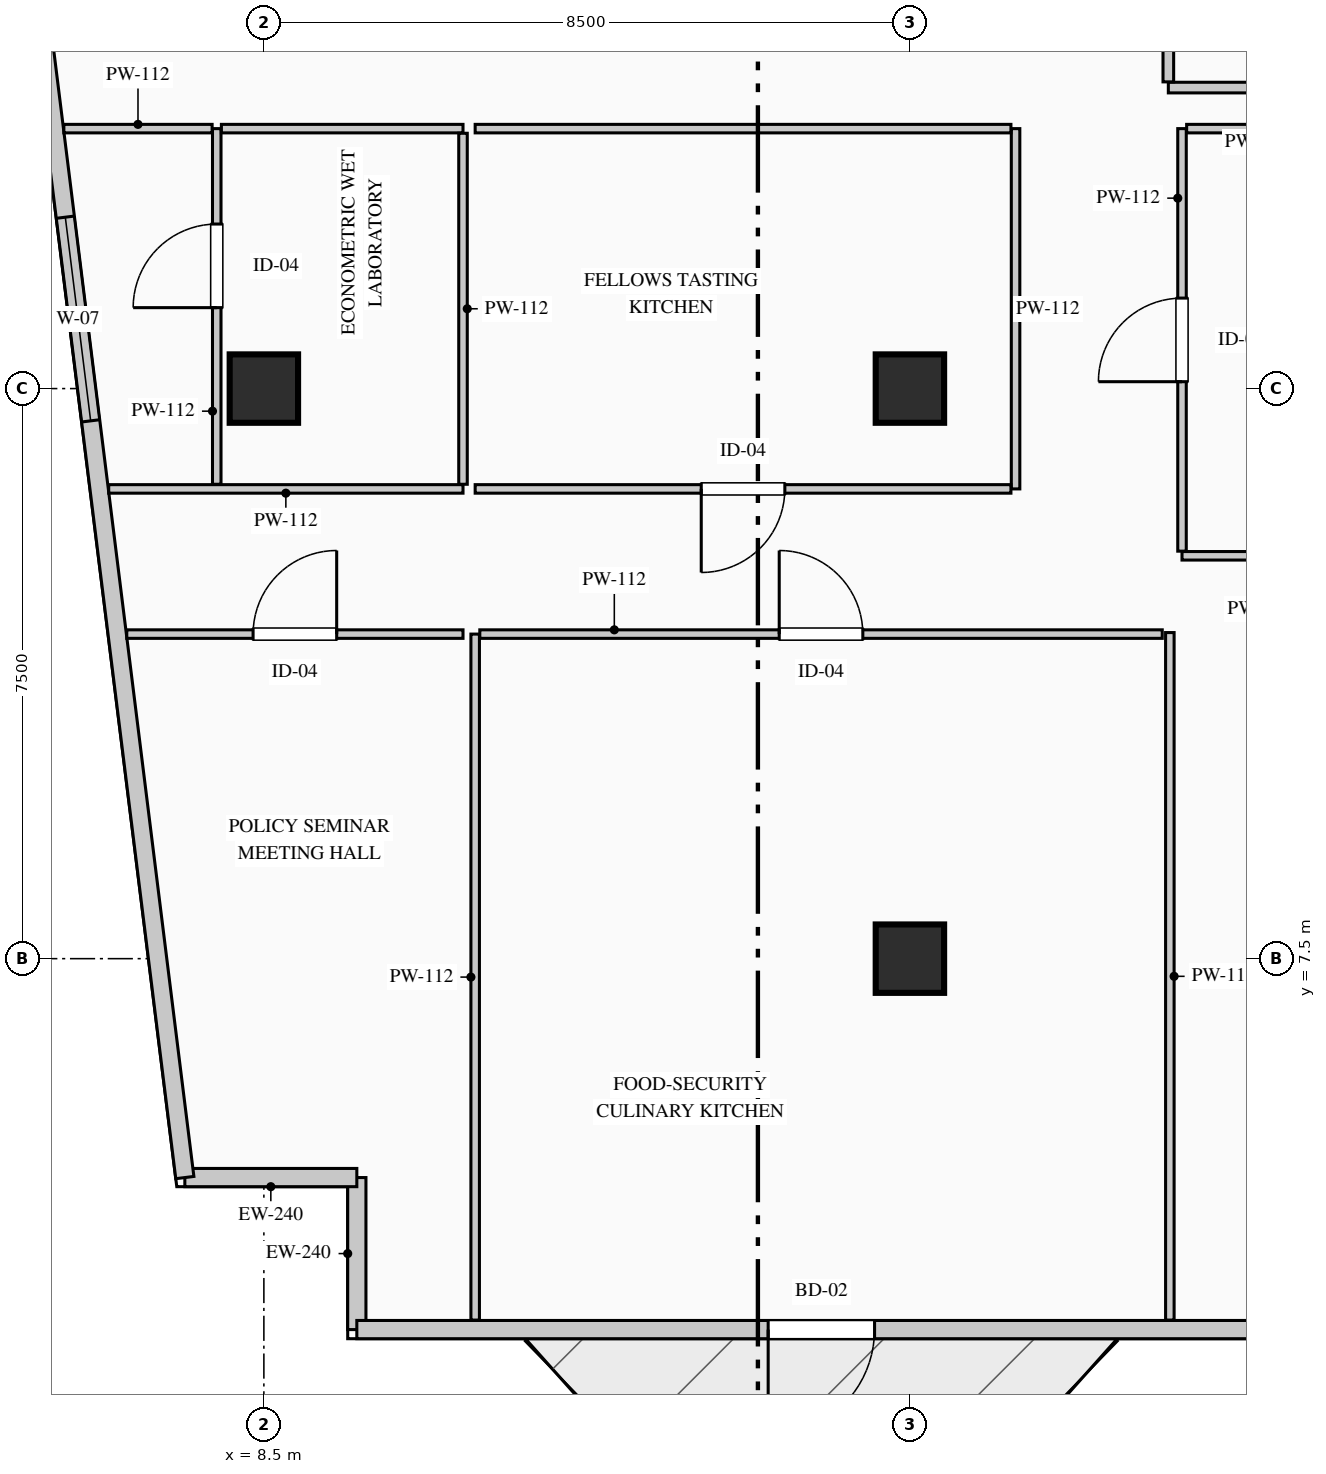
"""IFC4 building model, lengths in metres.
Left out: names, types, materials, properties, quantities, classifications, styles, units other than length and angle.
Written with IfcOpenShell. Run it as: python <this file> out.ifc"""

import sys

from ifc_helpers import new_model, si_unit, direction, frame, frame_2d, origin, origin_2d, place, context, subcontext, project, spatial, rectangle, extrude, element, fill, save


model = new_model("IFC4")
c1 = context("Model", 3, precision=1e-05, world=origin(), true_north=direction((0.0, 1.0)))
c2 = subcontext(c1, "Body", "Model", "MODEL_VIEW")
j1 = project(units=[si_unit("LENGTHUNIT", "METRE"), si_unit("PLANEANGLEUNIT", "RADIAN")], contexts=[c1])
p1 = place(None, origin())
s1 = spatial("IfcSite", under=j1, at=p1, CompositionType="ELEMENT")
p2 = place(p1, origin())
s2 = spatial("IfcBuilding", under=s1, at=p2, CompositionType="ELEMENT")
p3 = place(p2, frame((0.0, 0.0, 215.35)))
s3 = spatial("IfcBuildingStorey", under=s2, at=p3, CompositionType="ELEMENT", Elevation=215.35)
for number, where, z_axis, x_axis in (
    (1, (8.5, 15.0, 0.0), (0.0, 0.0, 1.0), (1.0, 0.0, 0.0)),
    (2, (17.0, 7.5, 0.0), (0.0, 0.0, 1.0), (1.0, 0.0, 0.0)),
    (3, (17.0, 15.0, 0.0), (0.0, 0.0, 1.0), (1.0, 0.0, 0.0)),
):
    element("IfcColumn", number, at=place(p3, frame(where, z_axis=z_axis, x_axis=x_axis)), inside=s3, PredefinedType="COLUMN", context=c2, shape_type="SweptSolid", body=[
        extrude(rectangle(XDim=0.9, YDim=0.9, at=origin_2d()), origin(), (0.0, 0.0, 1.0), 3.95),
    ])
p4 = place(p3, frame((9.723, 2.62, 0.0), z_axis=(0.0, 0.0, 1.0), x_axis=(0.0, 1.0, 0.0)))
e4 = element("IfcWall", 4, at=p4, inside=s3, PredefinedType="STANDARD", context=c2, shape_type="SweptSolid", body=[
    extrude(rectangle(XDim=2.0, YDim=0.24, at=frame_2d((1.0, 0.0))), origin(), (0.0, 0.0, 1.0), 3.7),
])
p5 = place(p3, frame((9.723, 4.62, 0.0), z_axis=(0.0, 0.0, 1.0), x_axis=(-1.0, 0.0, 0.0)))
e5 = element("IfcWall", 5, at=p5, inside=s3, PredefinedType="STANDARD", context=c2, shape_type="SweptSolid", body=[
    extrude(rectangle(XDim=2.263, YDim=0.24, at=frame_2d((1.131, 0.0))), origin(), (0.0, 0.0, 1.0), 3.7),
])
p6 = place(p3, frame((7.46, 4.62, 0.0), z_axis=(0.0, 0.0, 1.0), x_axis=(-0.123515576323, 0.992342633573, 0.0)))
e6 = element("IfcWall", 6, at=p6, inside=s3, PredefinedType="STANDARD", context=c2, shape_type="SweptSolid", body=[
    extrude(rectangle(XDim=37.043, YDim=0.24, at=frame_2d((18.522, 0.0))), origin(), (0.0, 0.0, 1.0), 3.7),
])
p7 = place(p6, frame((10.032, 0.0, 0.9)))
e7 = element("IfcOpeningElement", 7, at=p7, cuts=e6, PredefinedType="OPENING", context=c2, shape_type="SweptSolid", body=[
    extrude(rectangle(XDim=2.7, YDim=2.1, at=frame_2d((1.35, 1.05))), frame((0.0, 0.13, 0.0), z_axis=(0.0, -1.0, 0.0), x_axis=(1.0, 0.0, 0.0)), (0.0, 0.0, 1.0), 0.26),
])
p8 = place(p3, frame((21.946, 2.62, 0.0), z_axis=(0.0, 0.0, 1.0), x_axis=(-1.0, 0.0, 0.0)))
e8 = element("IfcWall", 8, at=p8, inside=s3, PredefinedType="STANDARD", context=c2, shape_type="SweptSolid", body=[
    extrude(rectangle(XDim=12.223, YDim=0.24, at=frame_2d((6.112, 0.0))), origin(), (0.0, 0.0, 1.0), 3.7),
])
p9 = place(p8, frame((5.411, 0.0, 0.0)))
e9 = element("IfcOpeningElement", 9, at=p9, cuts=e8, PredefinedType="OPENING", context=c2, shape_type="SweptSolid", body=[
    extrude(rectangle(XDim=1.4, YDim=2.2, at=frame_2d((0.7, 1.1))), frame((0.0, 0.13, 0.0), z_axis=(0.0, -1.0, 0.0), x_axis=(1.0, 0.0, 0.0)), (0.0, 0.0, 1.0), 0.26),
])
p10 = place(p3, frame((22.725, 18.96, 0.0), z_axis=(0.0, 0.0, 1.0), x_axis=(-1.0, 0.0, 0.0)))
e10 = element("IfcWall", 10, at=p10, inside=s3, PredefinedType="PARTITIONING", context=c2, shape_type="SweptSolid", body=[
    extrude(rectangle(XDim=2.325, YDim=0.14, at=frame_2d((1.163, 0.0))), origin(), (0.0, 0.0, 1.0), 3.7),
])
p11 = place(p3, frame((20.4, 19.035, 0.0), z_axis=(0.0, 0.0, 1.0), x_axis=(0.0, 1.0, 0.0)))
e11 = element("IfcWall", 11, at=p11, inside=s3, PredefinedType="PARTITIONING", context=c2, shape_type="SweptSolid", body=[
    extrude(rectangle(XDim=2.965, YDim=0.14, at=frame_2d((1.482, 0.0))), origin(), (0.0, 0.0, 1.0), 3.7),
])
p12 = place(p11, frame((1.008, 0.0, 0.0)))
e12 = element("IfcOpeningElement", 12, at=p12, cuts=e11, PredefinedType="OPENING", context=c2, shape_type="SweptSolid", body=[
    extrude(rectangle(XDim=0.95, YDim=2.15, at=frame_2d((0.475, 1.075))), frame((0.0, 0.08, 0.0), z_axis=(0.0, -1.0, 0.0), x_axis=(1.0, 0.0, 0.0)), (0.0, 0.0, 1.0), 0.16),
])
p13 = place(p3, frame((11.28, 2.745, 0.0), z_axis=(0.0, 0.0, 1.0), x_axis=(0.0, 1.0, 0.0)))
e13 = element("IfcWall", 13, at=p13, inside=s3, PredefinedType="PARTITIONING", context=c2, shape_type="SweptSolid", body=[
    extrude(rectangle(XDim=9.025, YDim=0.112, at=frame_2d((4.512, 0.0))), origin(), (0.0, 0.0, 1.0), 3.7),
])
p14 = place(p3, frame((11.341, 11.77, 0.0), z_axis=(0.0, 0.0, 1.0), x_axis=(1.0, 0.0, 0.0)))
e14 = element("IfcWall", 14, at=p14, inside=s3, PredefinedType="PARTITIONING", context=c2, shape_type="SweptSolid", body=[
    extrude(rectangle(XDim=8.979, YDim=0.112, at=frame_2d((4.49, 0.0))), origin(), (0.0, 0.0, 1.0), 3.7),
])
p15 = place(p14, frame((3.939, 0.0, 0.0)))
e15 = element("IfcOpeningElement", 15, at=p15, cuts=e14, PredefinedType="OPENING", context=c2, shape_type="SweptSolid", body=[
    extrude(rectangle(XDim=1.1, YDim=2.2, at=frame_2d((0.55, 1.1))), frame((0.0, 0.066, 0.0), z_axis=(0.0, -1.0, 0.0), x_axis=(1.0, 0.0, 0.0)), (0.0, 0.0, 1.0), 0.132),
])
p16 = place(p3, frame((20.42, 11.79, 0.0), z_axis=(0.0, 0.0, 1.0), x_axis=(0.0, -1.0, 0.0)))
e16 = element("IfcWall", 16, at=p16, inside=s3, PredefinedType="PARTITIONING", context=c2, shape_type="SweptSolid", body=[
    extrude(rectangle(XDim=9.045, YDim=0.112, at=frame_2d((4.522, 0.0))), origin(), (0.0, 0.0, 1.0), 3.7),
])
p17 = place(p3, frame((6.696, 11.77, 0.0), z_axis=(0.0, 0.0, 1.0), x_axis=(1.0, 0.0, 0.0)))
e17 = element("IfcWall", 17, at=p17, inside=s3, PredefinedType="PARTITIONING", context=c2, shape_type="SweptSolid", body=[
    extrude(rectangle(XDim=4.424, YDim=0.112, at=frame_2d((2.212, 0.0))), origin(), (0.0, 0.0, 1.0), 3.7),
])
p18 = place(p17, frame((1.662, 0.0, 0.0)))
e18 = element("IfcOpeningElement", 18, at=p18, cuts=e17, PredefinedType="OPENING", context=c2, shape_type="SweptSolid", body=[
    extrude(rectangle(XDim=1.1, YDim=2.2, at=frame_2d((0.55, 1.1))), frame((0.0, 0.066, 0.0), z_axis=(0.0, -1.0, 0.0), x_axis=(1.0, 0.0, 0.0)), (0.0, 0.0, 1.0), 0.132),
])
p19 = place(p3, frame((11.12, 13.68, 0.0), z_axis=(0.0, 0.0, 1.0), x_axis=(-1.0, 0.0, 0.0)))
e19 = element("IfcWall", 19, at=p19, inside=s3, PredefinedType="PARTITIONING", context=c2, shape_type="SweptSolid", body=[
    extrude(rectangle(XDim=4.662, YDim=0.112, at=frame_2d((2.331, 0.0))), origin(), (0.0, 0.0, 1.0), 3.7),
])
p20 = place(p3, frame((7.88, 13.741, 0.0), z_axis=(0.0, 0.0, 1.0), x_axis=(0.0, 1.0, 0.0)))
e20 = element("IfcWall", 20, at=p20, inside=s3, PredefinedType="PARTITIONING", context=c2, shape_type="SweptSolid", body=[
    extrude(rectangle(XDim=4.679, YDim=0.112, at=frame_2d((2.339, 0.0))), origin(), (0.0, 0.0, 1.0), 3.7),
])
p21 = place(p20, frame((2.324, 0.0, 0.0)))
e21 = element("IfcOpeningElement", 21, at=p21, cuts=e20, PredefinedType="OPENING", context=c2, shape_type="SweptSolid", body=[
    extrude(rectangle(XDim=1.1, YDim=2.2, at=frame_2d((0.55, 1.1))), frame((0.0, 0.066, 0.0), z_axis=(0.0, -1.0, 0.0), x_axis=(1.0, 0.0, 0.0)), (0.0, 0.0, 1.0), 0.132),
])
p22 = place(p3, frame((5.868, 18.42, 0.0), z_axis=(0.0, 0.0, 1.0), x_axis=(1.0, 0.0, 0.0)))
e22 = element("IfcWall", 22, at=p22, inside=s3, PredefinedType="PARTITIONING", context=c2, shape_type="SweptSolid", body=[
    extrude(rectangle(XDim=1.951, YDim=0.112, at=frame_2d((0.975, 0.0))), origin(), (0.0, 0.0, 1.0), 3.7),
])
p23 = place(p3, frame((7.941, 18.42, 0.0), z_axis=(0.0, 0.0, 1.0), x_axis=(1.0, 0.0, 0.0)))
e23 = element("IfcWall", 23, at=p23, inside=s3, PredefinedType="PARTITIONING", context=c2, shape_type="SweptSolid", body=[
    extrude(rectangle(XDim=3.179, YDim=0.112, at=frame_2d((1.59, 0.0))), origin(), (0.0, 0.0, 1.0), 3.7),
])
p24 = place(p3, frame((11.12, 18.359, 0.0), z_axis=(0.0, 0.0, 1.0), x_axis=(0.0, -1.0, 0.0)))
e24 = element("IfcWall", 24, at=p24, inside=s3, PredefinedType="PARTITIONING", context=c2, shape_type="SweptSolid", body=[
    extrude(rectangle(XDim=4.618, YDim=0.112, at=frame_2d((2.309, 0.0))), origin(), (0.0, 0.0, 1.0), 3.7),
])
p25 = place(p3, frame((18.39, 18.42, 0.0), z_axis=(0.0, 0.0, 1.0), x_axis=(0.0, -1.0, 0.0)))
e25 = element("IfcWall", 25, at=p25, inside=s3, PredefinedType="PARTITIONING", context=c2, shape_type="SweptSolid", body=[
    extrude(rectangle(XDim=4.74, YDim=0.112, at=frame_2d((2.37, 0.0))), origin(), (0.0, 0.0, 1.0), 3.7),
])
p26 = place(p3, frame((18.329, 13.68, 0.0), z_axis=(0.0, 0.0, 1.0), x_axis=(-1.0, 0.0, 0.0)))
e26 = element("IfcWall", 26, at=p26, inside=s3, PredefinedType="PARTITIONING", context=c2, shape_type="SweptSolid", body=[
    extrude(rectangle(XDim=7.049, YDim=0.112, at=frame_2d((3.524, 0.0))), origin(), (0.0, 0.0, 1.0), 3.7),
])
p27 = place(p26, frame((2.975, 0.0, 0.0)))
e27 = element("IfcOpeningElement", 27, at=p27, cuts=e26, PredefinedType="OPENING", context=c2, shape_type="SweptSolid", body=[
    extrude(rectangle(XDim=1.1, YDim=2.2, at=frame_2d((0.55, 1.1))), frame((0.0, 0.066, 0.0), z_axis=(0.0, -1.0, 0.0), x_axis=(1.0, 0.0, 0.0)), (0.0, 0.0, 1.0), 0.132),
])
p28 = place(p3, frame((11.28, 18.42, 0.0), z_axis=(0.0, 0.0, 1.0), x_axis=(1.0, 0.0, 0.0)))
e28 = element("IfcWall", 28, at=p28, inside=s3, PredefinedType="PARTITIONING", context=c2, shape_type="SweptSolid", body=[
    extrude(rectangle(XDim=7.049, YDim=0.112, at=frame_2d((3.524, 0.0))), origin(), (0.0, 0.0, 1.0), 3.7),
])
p29 = place(p3, frame((22.615, 12.8, 0.0), z_axis=(0.0, 0.0, 1.0), x_axis=(-1.0, 0.0, 0.0)))
e29 = element("IfcWall", 29, at=p29, inside=s3, PredefinedType="PARTITIONING", context=c2, shape_type="SweptSolid", body=[
    extrude(rectangle(XDim=2.035, YDim=0.112, at=frame_2d((1.018, 0.0))), origin(), (0.0, 0.0, 1.0), 3.7),
])
p30 = place(p3, frame((20.58, 12.861, 0.0), z_axis=(0.0, 0.0, 1.0), x_axis=(0.0, 1.0, 0.0)))
e30 = element("IfcWall", 30, at=p30, inside=s3, PredefinedType="PARTITIONING", context=c2, shape_type="SweptSolid", body=[
    extrude(rectangle(XDim=5.559, YDim=0.112, at=frame_2d((2.779, 0.0))), origin(), (0.0, 0.0, 1.0), 3.7),
])
p31 = place(p30, frame((2.229, 0.0, 0.0)))
e31 = element("IfcOpeningElement", 31, at=p31, cuts=e30, PredefinedType="OPENING", context=c2, shape_type="SweptSolid", body=[
    extrude(rectangle(XDim=1.1, YDim=2.2, at=frame_2d((0.55, 1.1))), frame((0.0, 0.066, 0.0), z_axis=(0.0, -1.0, 0.0), x_axis=(1.0, 0.0, 0.0)), (0.0, 0.0, 1.0), 0.132),
])
p32 = place(p3, frame((20.641, 18.42, 0.0), z_axis=(0.0, 0.0, 1.0), x_axis=(1.0, 0.0, 0.0)))
e32 = element("IfcWall", 32, at=p32, inside=s3, PredefinedType="PARTITIONING", context=c2, shape_type="SweptSolid", body=[
    extrude(rectangle(XDim=2.249, YDim=0.112, at=frame_2d((1.125, 0.0))), origin(), (0.0, 0.0, 1.0), 3.7),
])
p33 = place(p7, origin())
e33 = element("IfcWindow", 33, at=p33, inside=s3, PartitioningType="DOUBLE_PANEL_VERTICAL", PredefinedType="WINDOW", context=c2, shape_type="SweptSolid", body=[
    extrude(rectangle(XDim=2.7, YDim=2.1, at=frame_2d((1.35, 1.05))), frame((0.0, 0.03, 0.0), z_axis=(0.0, -1.0, 0.0), x_axis=(1.0, 0.0, 0.0)), (0.0, 0.0, 1.0), 0.06),
])
fill(e7, e33)
p34 = place(p9, origin())
e34 = element("IfcDoor", 34, at=p34, inside=s3, OperationType="SINGLE_SWING_RIGHT", PredefinedType="DOOR", context=c2, shape_type="SweptSolid", body=[
    extrude(rectangle(XDim=1.4, YDim=2.2, at=frame_2d((0.7, 1.1))), frame((0.0, 0.025, 0.0), z_axis=(0.0, -1.0, 0.0), x_axis=(1.0, 0.0, 0.0)), (0.0, 0.0, 1.0), 0.05),
])
fill(e9, e34)
p35 = place(p15, origin())
e35 = element("IfcDoor", 35, at=p35, inside=s3, OperationType="SINGLE_SWING_LEFT", PredefinedType="DOOR", context=c2, shape_type="SweptSolid", body=[
    extrude(rectangle(XDim=1.1, YDim=2.2, at=frame_2d((0.55, 1.1))), frame((0.0, 0.025, 0.0), z_axis=(0.0, -1.0, 0.0), x_axis=(1.0, 0.0, 0.0)), (0.0, 0.0, 1.0), 0.05),
])
fill(e15, e35)
p36 = place(p18, origin())
e36 = element("IfcDoor", 36, at=p36, inside=s3, OperationType="SINGLE_SWING_RIGHT", PredefinedType="DOOR", context=c2, shape_type="SweptSolid", body=[
    extrude(rectangle(XDim=1.1, YDim=2.2, at=frame_2d((0.55, 1.1))), frame((0.0, 0.025, 0.0), z_axis=(0.0, -1.0, 0.0), x_axis=(1.0, 0.0, 0.0)), (0.0, 0.0, 1.0), 0.05),
])
fill(e18, e36)
p37 = place(p21, origin())
e37 = element("IfcDoor", 37, at=p37, inside=s3, OperationType="SINGLE_SWING_LEFT", PredefinedType="DOOR", context=c2, shape_type="SweptSolid", body=[
    extrude(rectangle(XDim=1.1, YDim=2.2, at=frame_2d((0.55, 1.1))), frame((0.0, 0.025, 0.0), z_axis=(0.0, -1.0, 0.0), x_axis=(1.0, 0.0, 0.0)), (0.0, 0.0, 1.0), 0.05),
])
fill(e21, e37)
p38 = place(p27, origin())
e38 = element("IfcDoor", 38, at=p38, inside=s3, OperationType="SINGLE_SWING_RIGHT", PredefinedType="DOOR", context=c2, shape_type="SweptSolid", body=[
    extrude(rectangle(XDim=1.1, YDim=2.2, at=frame_2d((0.55, 1.1))), frame((0.0, 0.025, 0.0), z_axis=(0.0, -1.0, 0.0), x_axis=(1.0, 0.0, 0.0)), (0.0, 0.0, 1.0), 0.05),
])
fill(e27, e38)
p39 = place(p31, origin())
e39 = element("IfcDoor", 39, at=p39, inside=s3, OperationType="SINGLE_SWING_LEFT", PredefinedType="DOOR", context=c2, shape_type="SweptSolid", body=[
    extrude(rectangle(XDim=1.1, YDim=2.2, at=frame_2d((0.55, 1.1))), frame((0.0, 0.025, 0.0), z_axis=(0.0, -1.0, 0.0), x_axis=(1.0, 0.0, 0.0)), (0.0, 0.0, 1.0), 0.05),
])
fill(e31, e39)
save(model, sys.argv[1])
